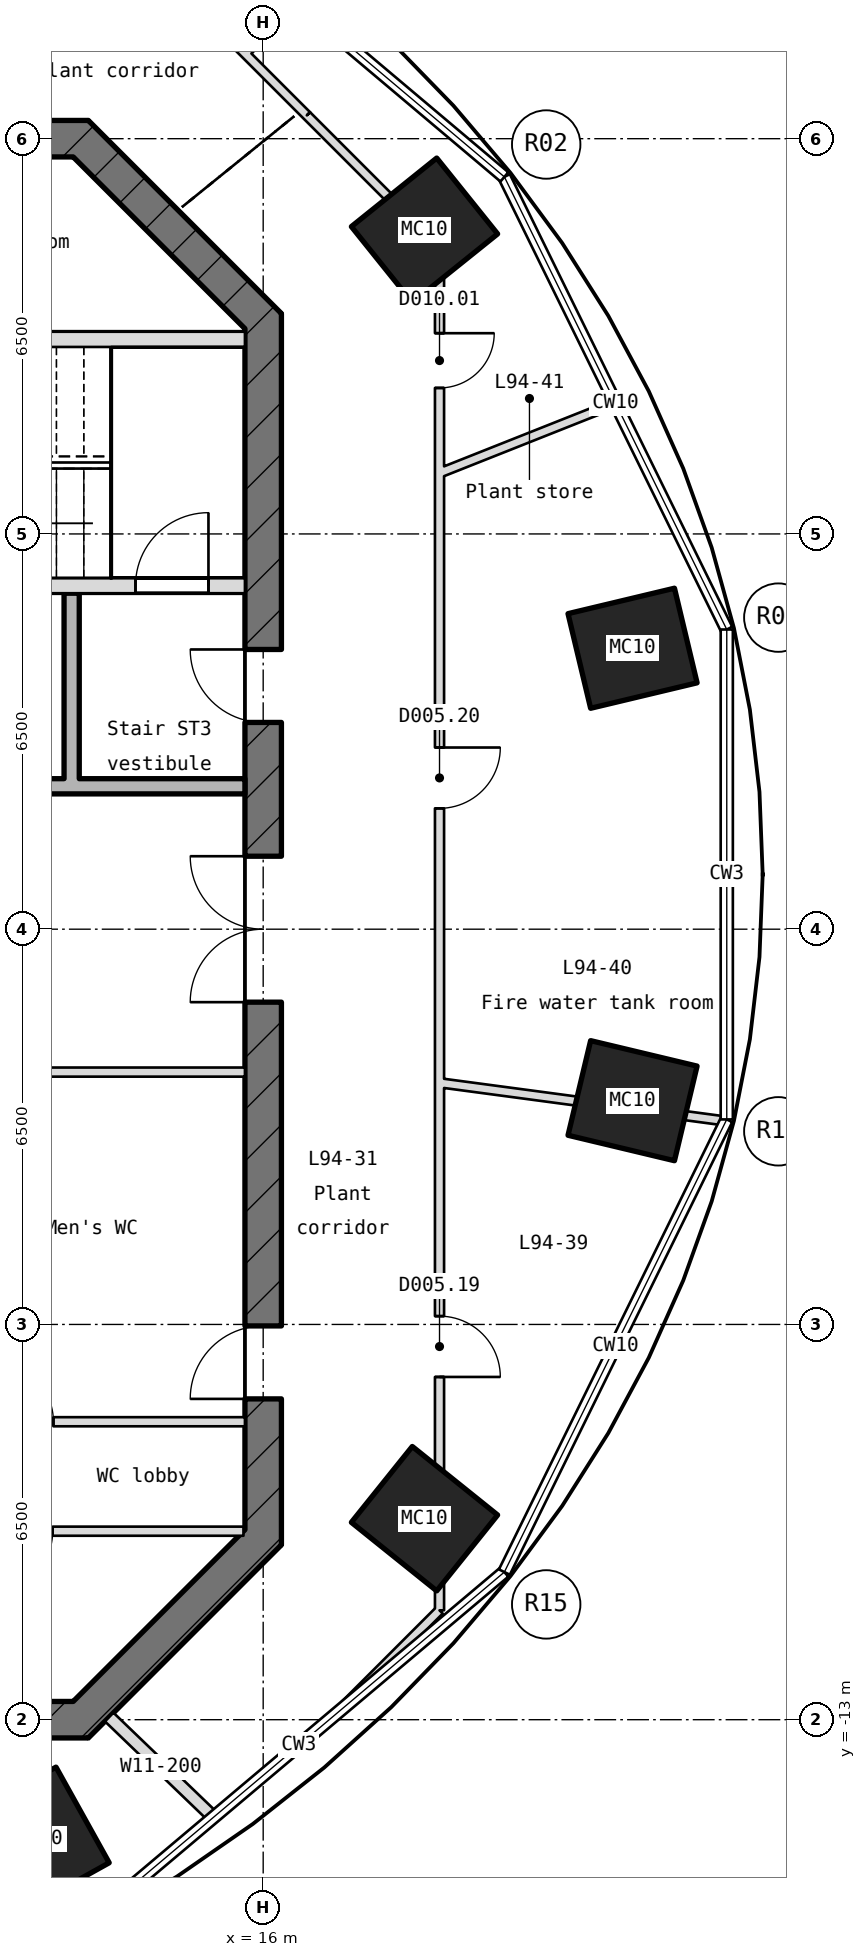
"""IFC4 building model, lengths in metres.
Left out: names, types, materials, properties, quantities, classifications, styles, units other than length and angle.
Written with IfcOpenShell. Run it as: python <this file> out.ifc"""

import sys

from ifc_helpers import new_model, si_unit, direction, frame, frame_2d, origin, origin_2d, place, context, subcontext, project, spatial, rectangle, hollow_rectangle, extrude, element, fill, save


model = new_model("IFC4")
c1 = context("Model", 3, precision=1e-05, world=origin(), true_north=direction((0.0, 1.0)))
c2 = subcontext(c1, "Body", "Model", "MODEL_VIEW")
j1 = project(units=[si_unit("LENGTHUNIT", "METRE"), si_unit("PLANEANGLEUNIT", "RADIAN")], contexts=[c1])
p1 = place(None, origin())
s1 = spatial("IfcSite", under=j1, at=p1, CompositionType="ELEMENT")
p2 = place(p1, origin())
s2 = spatial("IfcBuilding", under=s1, at=p2, CompositionType="ELEMENT")
p3 = place(p2, frame((0.0, 0.0, 418.55)))
s3 = spatial("IfcBuildingStorey", under=s2, at=p3, CompositionType="ELEMENT", Elevation=418.55)
for number, where, z_axis, x_axis in (
    (1, (22.075, 4.62, -0.2), (0.0, 0.0, 1.0), (0.232, -0.973, 0.0)),
    (2, (18.653, 11.494, -0.2), (0.0, 0.0, 1.0), (0.626, -0.78, 0.0)),
    (3, (12.331, -14.955, -0.2), (0.0, 0.0, 1.0), (-0.874, -0.486, 0.0)),
    (4, (18.653, -9.694, -0.2), (0.0, 0.0, 1.0), (-0.626, -0.78, 0.0)),
    (5, (22.075, -2.82, -0.2), (0.0, 0.0, 1.0), (-0.232, -0.973, 0.0)),
):
    element("IfcColumn", number, at=place(p3, frame(where, z_axis=z_axis, x_axis=x_axis)), inside=s3, PredefinedType="COLUMN", context=c2, shape_type="SweptSolid", body=[
        extrude(hollow_rectangle(XDim=1.6, YDim=1.8, WallThickness=0.045, at=origin_2d()), origin(), (0.0, 0.0, 1.0), 4.9),
    ])
p4 = place(p3, frame((12.912, -13.088, -0.2), z_axis=(0.0, 0.0, 1.0), x_axis=(0.707106781187, 0.707106781187, 0.0)))
e6 = element("IfcWall", 6, at=p4, inside=s3, PredefinedType="SHEAR", context=c2, shape_type="SweptSolid", body=[
    extrude(rectangle(XDim=4.491, YDim=0.6, at=frame_2d((2.246, 0.0))), origin(), (0.0, 0.0, 1.0), 4.9),
])
p5 = place(p3, frame((16.0, -10.124, -0.2), z_axis=(0.0, 0.0, 1.0), x_axis=(0.0, 1.0, 0.0)))
e7 = element("IfcWall", 7, at=p5, inside=s3, PredefinedType="SHEAR", context=c2, shape_type="SweptSolid", body=[
    extrude(rectangle(XDim=20.249, YDim=0.6, at=frame_2d((10.124, 0.0))), origin(), (0.0, 0.0, 1.0), 4.9),
])
p6 = place(p5, frame((8.924, 0.0, 0.2)))
e8 = element("IfcOpeningElement", 8, at=p6, cuts=e7, PredefinedType="OPENING", context=c2, shape_type="SweptSolid", body=[
    extrude(rectangle(XDim=2.4, YDim=2.1, at=frame_2d((1.2, 1.05))), frame((0.0, 0.31, 0.0), z_axis=(0.0, -1.0, 0.0), x_axis=(1.0, 0.0, 0.0)), (0.0, 0.0, 1.0), 0.62),
])
p7 = place(p5, frame((13.524, 0.0, 0.2)))
e9 = element("IfcOpeningElement", 9, at=p7, cuts=e7, PredefinedType="OPENING", context=c2, shape_type="SweptSolid", body=[
    extrude(rectangle(XDim=1.2, YDim=2.1, at=frame_2d((0.6, 1.05))), frame((0.0, 0.31, 0.0), z_axis=(0.0, -1.0, 0.0), x_axis=(1.0, 0.0, 0.0)), (0.0, 0.0, 1.0), 0.62),
])
p8 = place(p5, frame((2.4, 0.0, 0.2)))
e10 = element("IfcOpeningElement", 10, at=p8, cuts=e7, PredefinedType="OPENING", context=c2, shape_type="SweptSolid", body=[
    extrude(rectangle(XDim=1.2, YDim=2.1, at=frame_2d((0.6, 1.05))), frame((0.0, 0.31, 0.0), z_axis=(0.0, -1.0, 0.0), x_axis=(1.0, 0.0, 0.0)), (0.0, 0.0, 1.0), 0.62),
])
p9 = place(p3, frame((16.088, 9.912, -0.2), z_axis=(0.0, 0.0, 1.0), x_axis=(-0.707106781187, 0.707106781187, 0.0)))
e11 = element("IfcWall", 11, at=p9, inside=s3, PredefinedType="SHEAR", context=c2, shape_type="SweptSolid", body=[
    extrude(rectangle(XDim=4.491, YDim=0.6, at=frame_2d((2.246, 0.0))), origin(), (0.0, 0.0, 1.0), 4.9),
])
p10 = place(p3, frame((13.124, 13.0, -0.2), z_axis=(0.0, 0.0, 1.0), x_axis=(-1.0, 0.0, 0.0)))
e12 = element("IfcWall", 12, at=p10, inside=s3, PredefinedType="SHEAR", context=c2, shape_type="SweptSolid", body=[
    extrude(rectangle(XDim=26.249, YDim=0.6, at=frame_2d((13.124, 0.0))), origin(), (0.0, 0.0, 1.0), 4.9),
])
p11 = place(p10, frame((22.062, 0.0, 0.2)))
e13 = element("IfcOpeningElement", 13, at=p11, cuts=e12, PredefinedType="OPENING", context=c2, shape_type="SweptSolid", body=[
    extrude(rectangle(XDim=1.0, YDim=2.1, at=frame_2d((0.5, 1.05))), frame((0.0, 0.31, 0.0), z_axis=(0.0, -1.0, 0.0), x_axis=(1.0, 0.0, 0.0)), (0.0, 0.0, 1.0), 0.62),
])
p12 = place(p10, frame((15.374, 0.0, 0.2)))
e14 = element("IfcOpeningElement", 14, at=p12, cuts=e12, PredefinedType="OPENING", context=c2, shape_type="SweptSolid", body=[
    extrude(rectangle(XDim=1.0, YDim=2.1, at=frame_2d((0.5, 1.05))), frame((0.0, 0.31, 0.0), z_axis=(0.0, -1.0, 0.0), x_axis=(1.0, 0.0, 0.0)), (0.0, 0.0, 1.0), 0.62),
])
p13 = place(p10, frame((7.874, 0.0, 0.2)))
e15 = element("IfcOpeningElement", 15, at=p13, cuts=e12, PredefinedType="OPENING", context=c2, shape_type="SweptSolid", body=[
    extrude(rectangle(XDim=1.0, YDim=2.1, at=frame_2d((0.5, 1.05))), frame((0.0, 0.31, 0.0), z_axis=(0.0, -1.0, 0.0), x_axis=(1.0, 0.0, 0.0)), (0.0, 0.0, 1.0), 0.62),
])
p14 = place(p10, frame((2.4, 0.0, 0.2)))
e16 = element("IfcOpeningElement", 16, at=p14, cuts=e12, PredefinedType="OPENING", context=c2, shape_type="SweptSolid", body=[
    extrude(rectangle(XDim=1.0, YDim=2.1, at=frame_2d((0.5, 1.05))), frame((0.0, 0.31, 0.0), z_axis=(0.0, -1.0, 0.0), x_axis=(1.0, 0.0, 0.0)), (0.0, 0.0, 1.0), 0.62),
])
p15 = place(p3, frame((-13.124, -13.0, -0.2), z_axis=(0.0, 0.0, 1.0), x_axis=(1.0, 0.0, 0.0)))
e17 = element("IfcWall", 17, at=p15, inside=s3, PredefinedType="SHEAR", context=c2, shape_type="SweptSolid", body=[
    extrude(rectangle(XDim=26.249, YDim=0.6, at=frame_2d((13.124, 0.0))), origin(), (0.0, 0.0, 1.0), 4.9),
])
p16 = place(p15, frame((2.824, 0.0, 0.2)))
e18 = element("IfcOpeningElement", 18, at=p16, cuts=e17, PredefinedType="OPENING", context=c2, shape_type="SweptSolid", body=[
    extrude(rectangle(XDim=1.2, YDim=2.1, at=frame_2d((0.6, 1.05))), frame((0.0, 0.31, 0.0), z_axis=(0.0, -1.0, 0.0), x_axis=(1.0, 0.0, 0.0)), (0.0, 0.0, 1.0), 0.62),
])
p17 = place(p15, frame((6.824, 0.0, 0.2)))
e19 = element("IfcOpeningElement", 19, at=p17, cuts=e17, PredefinedType="OPENING", context=c2, shape_type="SweptSolid", body=[
    extrude(rectangle(XDim=1.4, YDim=2.1, at=frame_2d((0.7, 1.05))), frame((0.0, 0.31, 0.0), z_axis=(0.0, -1.0, 0.0), x_axis=(1.0, 0.0, 0.0)), (0.0, 0.0, 1.0), 0.62),
])
p18 = place(p15, frame((15.424, 0.0, 0.2)))
e20 = element("IfcOpeningElement", 20, at=p18, cuts=e17, PredefinedType="OPENING", context=c2, shape_type="SweptSolid", body=[
    extrude(rectangle(XDim=1.4, YDim=2.1, at=frame_2d((0.7, 1.05))), frame((0.0, 0.31, 0.0), z_axis=(0.0, -1.0, 0.0), x_axis=(1.0, 0.0, 0.0)), (0.0, 0.0, 1.0), 0.62),
])
p19 = place(p3, frame((8.475, -9.9, 0.0), z_axis=(0.0, 0.0, 1.0), x_axis=(1.0, 0.0, 0.0)))
e21 = element("IfcWall", 21, at=p19, inside=s3, PredefinedType="PARTITIONING", context=c2, shape_type="SweptSolid", body=[
    extrude(rectangle(XDim=7.201, YDim=0.15, at=frame_2d((3.6, 0.0))), origin(), (0.0, 0.0, 1.0), 4.7),
])
p20 = place(p19, frame((3.063, 0.0, 0.0)))
e22 = element("IfcOpeningElement", 22, at=p20, cuts=e21, PredefinedType="OPENING", context=c2, shape_type="SweptSolid", body=[
    extrude(rectangle(XDim=1.0, YDim=2.1, at=frame_2d((0.5, 1.05))), frame((0.0, 0.085, 0.0), z_axis=(0.0, -1.0, 0.0), x_axis=(1.0, 0.0, 0.0)), (0.0, 0.0, 1.0), 0.17),
])
p21 = place(p3, frame((8.55, -8.1, 0.0), z_axis=(0.0, 0.0, 1.0), x_axis=(1.0, 0.0, 0.0)))
e23 = element("IfcWall", 23, at=p21, inside=s3, PredefinedType="PARTITIONING", context=c2, shape_type="SweptSolid", body=[
    extrude(rectangle(XDim=7.15, YDim=0.15, at=frame_2d((3.575, 0.0))), origin(), (0.0, 0.0, 1.0), 4.7),
])
p22 = place(p21, frame((3.0, 0.0, 0.0)))
e24 = element("IfcOpeningElement", 24, at=p22, cuts=e23, PredefinedType="OPENING", context=c2, shape_type="SweptSolid", body=[
    extrude(rectangle(XDim=1.0, YDim=2.1, at=frame_2d((0.5, 1.05))), frame((0.0, 0.085, 0.0), z_axis=(0.0, -1.0, 0.0), x_axis=(1.0, 0.0, 0.0)), (0.0, 0.0, 1.0), 0.17),
])
p23 = place(p3, frame((8.4, -2.35, 0.0), z_axis=(0.0, 0.0, 1.0), x_axis=(1.0, 0.0, 0.0)))
e25 = element("IfcWall", 25, at=p23, inside=s3, PredefinedType="PARTITIONING", context=c2, shape_type="SweptSolid", body=[
    extrude(rectangle(XDim=7.3, YDim=0.15, at=frame_2d((3.65, 0.0))), origin(), (0.0, 0.0, 1.0), 4.7),
])
p24 = place(p3, frame((8.4, 2.35, 0.0), z_axis=(0.0, 0.0, 1.0), x_axis=(1.0, 0.0, 0.0)))
e26 = element("IfcWall", 26, at=p24, inside=s3, PredefinedType="STANDARD", context=c2, shape_type="SweptSolid", body=[
    extrude(rectangle(XDim=7.3, YDim=0.25, at=frame_2d((3.65, 0.0))), origin(), (0.0, 0.0, 1.0), 4.7),
])
p25 = place(p3, frame((8.55, 5.65, -0.2), z_axis=(0.0, 0.0, 1.0), x_axis=(1.0, 0.0, 0.0)))
e27 = element("IfcWall", 27, at=p25, inside=s3, PredefinedType="SHEAR", context=c2, shape_type="SweptSolid", body=[
    extrude(rectangle(XDim=7.15, YDim=0.25, at=frame_2d((3.575, 0.0))), origin(), (0.0, 0.0, 1.0), 4.9),
])
p26 = place(p25, frame((5.35, 0.0, 0.2)))
e28 = element("IfcOpeningElement", 28, at=p26, cuts=e27, PredefinedType="OPENING", context=c2, shape_type="SweptSolid", body=[
    extrude(rectangle(XDim=1.2, YDim=2.1, at=frame_2d((0.6, 1.05))), frame((0.0, 0.135, 0.0), z_axis=(0.0, -1.0, 0.0), x_axis=(1.0, 0.0, 0.0)), (0.0, 0.0, 1.0), 0.27),
])
p27 = place(p3, frame((8.55, 9.7, -0.2), z_axis=(0.0, 0.0, 1.0), x_axis=(1.0, 0.0, 0.0)))
e29 = element("IfcWall", 29, at=p27, inside=s3, PredefinedType="SHEAR", context=c2, shape_type="SweptSolid", body=[
    extrude(rectangle(XDim=7.15, YDim=0.25, at=frame_2d((3.575, 0.0))), origin(), (0.0, 0.0, 1.0), 4.9),
])
p28 = place(p3, frame((12.85, 2.475, 0.0), z_axis=(0.0, 0.0, 1.0), x_axis=(0.0, 1.0, 0.0)))
e30 = element("IfcWall", 30, at=p28, inside=s3, PredefinedType="STANDARD", context=c2, shape_type="SweptSolid", body=[
    extrude(rectangle(XDim=3.05, YDim=0.25, at=frame_2d((1.525, 0.0))), origin(), (0.0, 0.0, 1.0), 4.7),
])
p29 = place(p3, frame((18.9, 7.501, 0.0), z_axis=(0.0, 0.0, 1.0), x_axis=(0.92946881875, 0.368900684428, 0.0)))
e31 = element("IfcWall", 31, at=p29, inside=s3, PredefinedType="PARTITIONING", context=c2, shape_type="SweptSolid", body=[
    extrude(rectangle(XDim=3.095, YDim=0.15, at=frame_2d((1.548, 0.0))), origin(), (0.0, 0.0, 1.0), 4.7),
])
p30 = place(p3, frame((15.698, 14.404, 0.0), z_axis=(0.0, 0.0, 1.0), x_axis=(0.736966436557, 0.67592933905, 0.0)))
e32 = element("IfcWall", 32, at=p30, inside=s3, PredefinedType="PARTITIONING", context=c2, shape_type="SweptSolid", body=[
    extrude(rectangle(XDim=1.188, YDim=0.15, at=frame_2d((0.594, 0.0))), origin(), (0.0, 0.0, 1.0), 4.7),
])
p31 = place(p3, frame((17.347, -12.755, 0.0), z_axis=(0.0, 0.0, 1.0), x_axis=(0.707106781187, 0.707106781187, 0.0)))
e33 = element("IfcWall", 33, at=p31, inside=s3, PredefinedType="PARTITIONING", context=c2, shape_type="SweptSolid", body=[
    extrude(rectangle(XDim=2.197, YDim=0.15, at=frame_2d((1.098, 0.0))), origin(), (0.0, 0.0, 1.0), 4.7),
])
p32 = place(p3, frame((18.9, -11.201, 0.0), z_axis=(0.0, 0.0, 1.0), x_axis=(0.0, 1.0, 0.0)))
e34 = element("IfcWall", 34, at=p32, inside=s3, PredefinedType="PARTITIONING", context=c2, shape_type="SweptSolid", body=[
    extrude(rectangle(XDim=22.403, YDim=0.15, at=frame_2d((11.201, 0.0))), origin(), (0.0, 0.0, 1.0), 4.7),
])
p33 = place(p32, frame((3.838, 0.0, 0.0)))
e35 = element("IfcOpeningElement", 35, at=p33, cuts=e34, PredefinedType="OPENING", context=c2, shape_type="SweptSolid", body=[
    extrude(rectangle(XDim=1.0, YDim=2.1, at=frame_2d((0.5, 1.05))), frame((0.0, 0.085, 0.0), z_axis=(0.0, -1.0, 0.0), x_axis=(1.0, 0.0, 0.0)), (0.0, 0.0, 1.0), 0.17),
])
p34 = place(p32, frame((13.189, 0.0, 0.0)))
e36 = element("IfcOpeningElement", 36, at=p34, cuts=e34, PredefinedType="OPENING", context=c2, shape_type="SweptSolid", body=[
    extrude(rectangle(XDim=1.0, YDim=2.1, at=frame_2d((0.5, 1.05))), frame((0.0, 0.085, 0.0), z_axis=(0.0, -1.0, 0.0), x_axis=(1.0, 0.0, 0.0)), (0.0, 0.0, 1.0), 0.17),
])
p35 = place(p32, frame((20.102, 0.0, 0.0)))
e37 = element("IfcOpeningElement", 37, at=p35, cuts=e34, PredefinedType="OPENING", context=c2, shape_type="SweptSolid", body=[
    extrude(rectangle(XDim=0.9, YDim=2.1, at=frame_2d((0.45, 1.05))), frame((0.0, 0.085, 0.0), z_axis=(0.0, -1.0, 0.0), x_axis=(1.0, 0.0, 0.0)), (0.0, 0.0, 1.0), 0.17),
])
p36 = place(p3, frame((18.9, 11.201, 0.0), z_axis=(0.0, 0.0, 1.0), x_axis=(-0.707283756971, 0.706929761097, 0.0)))
e38 = element("IfcWall", 38, at=p36, inside=s3, PredefinedType="PARTITIONING", context=c2, shape_type="SweptSolid", body=[
    extrude(rectangle(XDim=0.69, YDim=0.15, at=frame_2d((0.345, 0.0))), origin(), (0.0, 0.0, 1.0), 4.7),
])
p37 = place(p3, frame((18.412, 11.689, 0.0), z_axis=(0.0, 0.0, 1.0), x_axis=(-0.707055846068, 0.707157712636, 0.0)))
e39 = element("IfcWall", 39, at=p37, inside=s3, PredefinedType="PARTITIONING", context=c2, shape_type="SweptSolid", body=[
    extrude(rectangle(XDim=2.397, YDim=0.15, at=frame_2d((1.198, 0.0))), origin(), (0.0, 0.0, 1.0), 4.238),
])
p38 = place(p3, frame((16.718, 13.384, 0.0), z_axis=(0.0, 0.0, 1.0), x_axis=(-0.707072476431, 0.707141084278, 0.0)))
e40 = element("IfcWall", 40, at=p38, inside=s3, PredefinedType="PARTITIONING", context=c2, shape_type="SweptSolid", body=[
    extrude(rectangle(XDim=3.559, YDim=0.15, at=frame_2d((1.779, 0.0))), origin(), (0.0, 0.0, 1.0), 4.7),
])
p39 = place(p3, frame((23.59, -3.153, 0.0), z_axis=(0.0, 0.0, 1.0), x_axis=(-0.991190460291, 0.13244422006, 0.0)))
e41 = element("IfcWall", 41, at=p39, inside=s3, PredefinedType="PARTITIONING", context=c2, shape_type="SweptSolid", body=[
    extrude(rectangle(XDim=4.732, YDim=0.15, at=frame_2d((2.366, 0.0))), origin(), (0.0, 0.0, 1.0), 4.7),
])
p40 = place(p3, frame((15.167, -14.592, 0.0), z_axis=(0.0, 0.0, 1.0), x_axis=(-0.720588348466, 0.69336313145, 0.0)))
e42 = element("IfcWall", 42, at=p40, inside=s3, PredefinedType="PARTITIONING", context=c2, shape_type="SweptSolid", body=[
    extrude(rectangle(XDim=2.358, YDim=0.2, at=frame_2d((1.179, 0.0))), origin(), (0.0, 0.0, 1.0), 4.7),
])
p41 = place(p26, origin())
e43 = element("IfcDoor", 43, at=p41, inside=s3, OperationType="SINGLE_SWING_RIGHT", PredefinedType="DOOR", context=c2, shape_type="SweptSolid", body=[
    extrude(rectangle(XDim=1.2, YDim=2.1, at=frame_2d((0.6, 1.05))), frame((0.0, 0.025, 0.0), z_axis=(0.0, -1.0, 0.0), x_axis=(1.0, 0.0, 0.0)), (0.0, 0.0, 1.0), 0.05),
])
fill(e28, e43)
p42 = place(p6, origin())
e44 = element("IfcDoor", 44, at=p42, inside=s3, OperationType="DOUBLE_DOOR_SINGLE_SWING", PredefinedType="DOOR", context=c2, shape_type="SweptSolid", body=[
    extrude(rectangle(XDim=2.4, YDim=2.1, at=frame_2d((1.2, 1.05))), frame((0.0, 0.025, 0.0), z_axis=(0.0, -1.0, 0.0), x_axis=(1.0, 0.0, 0.0)), (0.0, 0.0, 1.0), 0.05),
])
fill(e8, e44)
p43 = place(p7, origin())
e45 = element("IfcDoor", 45, at=p43, inside=s3, OperationType="SINGLE_SWING_RIGHT", PredefinedType="DOOR", context=c2, shape_type="SweptSolid", body=[
    extrude(rectangle(XDim=1.2, YDim=2.1, at=frame_2d((0.6, 1.05))), frame((0.0, 0.025, 0.0), z_axis=(0.0, -1.0, 0.0), x_axis=(1.0, 0.0, 0.0)), (0.0, 0.0, 1.0), 0.05),
])
fill(e9, e45)
p44 = place(p22, origin())
e46 = element("IfcDoor", 46, at=p44, inside=s3, OperationType="SINGLE_SWING_RIGHT", PredefinedType="DOOR", context=c2, shape_type="SweptSolid", body=[
    extrude(rectangle(XDim=1.0, YDim=2.1, at=frame_2d((0.5, 1.05))), frame((0.0, 0.025, 0.0), z_axis=(0.0, -1.0, 0.0), x_axis=(1.0, 0.0, 0.0)), (0.0, 0.0, 1.0), 0.05),
])
fill(e24, e46)
p45 = place(p8, origin())
e47 = element("IfcDoor", 47, at=p45, inside=s3, OperationType="SINGLE_SWING_RIGHT", PredefinedType="DOOR", context=c2, shape_type="SweptSolid", body=[
    extrude(rectangle(XDim=1.2, YDim=2.1, at=frame_2d((0.6, 1.05))), frame((0.0, 0.025, 0.0), z_axis=(0.0, -1.0, 0.0), x_axis=(1.0, 0.0, 0.0)), (0.0, 0.0, 1.0), 0.05),
])
fill(e10, e47)
p46 = place(p33, frame((1.0, 0.0, 0.0), z_axis=(0.0, 0.0, 1.0), x_axis=(-1.0, 0.0, 0.0)))
e48 = element("IfcDoor", 48, at=p46, inside=s3, OperationType="SINGLE_SWING_LEFT", PredefinedType="DOOR", context=c2, shape_type="SweptSolid", body=[
    extrude(rectangle(XDim=1.0, YDim=2.1, at=frame_2d((0.5, 1.05))), frame((0.0, 0.025, 0.0), z_axis=(0.0, -1.0, 0.0), x_axis=(1.0, 0.0, 0.0)), (0.0, 0.0, 1.0), 0.05),
])
fill(e35, e48)
p47 = place(p34, frame((1.0, 0.0, 0.0), z_axis=(0.0, 0.0, 1.0), x_axis=(-1.0, 0.0, 0.0)))
e49 = element("IfcDoor", 49, at=p47, inside=s3, OperationType="SINGLE_SWING_LEFT", PredefinedType="DOOR", context=c2, shape_type="SweptSolid", body=[
    extrude(rectangle(XDim=1.0, YDim=2.1, at=frame_2d((0.5, 1.05))), frame((0.0, 0.025, 0.0), z_axis=(0.0, -1.0, 0.0), x_axis=(1.0, 0.0, 0.0)), (0.0, 0.0, 1.0), 0.05),
])
fill(e36, e49)
p48 = place(p35, frame((0.9, 0.0, 0.0), z_axis=(0.0, 0.0, 1.0), x_axis=(-1.0, 0.0, 0.0)))
e50 = element("IfcDoor", 50, at=p48, inside=s3, OperationType="SINGLE_SWING_LEFT", PredefinedType="DOOR", context=c2, shape_type="SweptSolid", body=[
    extrude(rectangle(XDim=0.9, YDim=2.1, at=frame_2d((0.45, 1.05))), frame((0.0, 0.025, 0.0), z_axis=(0.0, -1.0, 0.0), x_axis=(1.0, 0.0, 0.0)), (0.0, 0.0, 1.0), 0.05),
])
fill(e37, e50)
save(model, sys.argv[1])
